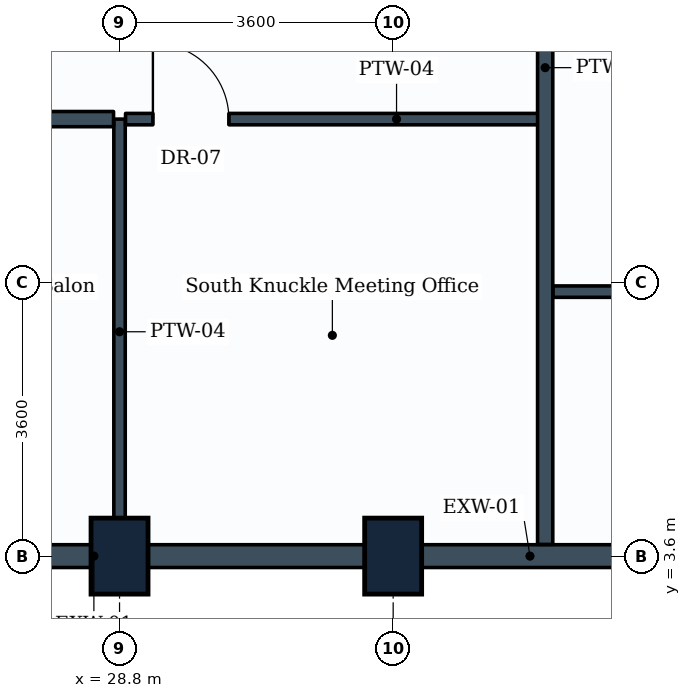
"""IFC4 building model, lengths in metres.
Left out: names, types, materials, properties, quantities, classifications, styles, units other than length and angle.
Written with IfcOpenShell. Run it as: python <this file> out.ifc"""

import sys

from ifc_helpers import new_model, si_unit, direction, frame, frame_2d, origin, origin_2d, place, context, subcontext, project, spatial, rectangle, extrude, element, fill, save


model = new_model("IFC4")
c1 = context("Model", 3, precision=1e-05, world=origin(), true_north=direction((0.0, 1.0)))
c2 = subcontext(c1, "Body", "Model", "MODEL_VIEW")
j1 = project(units=[si_unit("LENGTHUNIT", "METRE"), si_unit("PLANEANGLEUNIT", "RADIAN")], contexts=[c1])
p1 = place(None, origin())
s1 = spatial("IfcSite", under=j1, at=p1, CompositionType="ELEMENT")
p2 = place(p1, origin())
s2 = spatial("IfcBuilding", under=s1, at=p2, CompositionType="ELEMENT")
p3 = place(p2, frame((0.0, 0.0, 158.0)))
s3 = spatial("IfcBuildingStorey", under=s2, at=p3, CompositionType="ELEMENT", Elevation=158.0)
for number, where, z_axis, x_axis in (
    (1, (28.8, 3.6, 0.0), (0.0, 0.0, 1.0), (1.0, 0.0, 0.0)),
    (2, (32.4, 3.6, 0.0), (0.0, 0.0, 1.0), (1.0, 0.0, 0.0)),
):
    element("IfcColumn", number, at=place(p3, frame(where, z_axis=z_axis, x_axis=x_axis)), inside=s3, PredefinedType="COLUMN", context=c2, shape_type="SweptSolid", body=[
        extrude(rectangle(XDim=0.75, YDim=1.0, at=origin_2d()), origin(), (0.0, 0.0, 1.0), 3.8),
    ])
p4 = place(p3, frame((28.8, 3.6, 0.0), z_axis=(0.0, 0.0, 1.0), x_axis=(-1.0, 0.0, 0.0)))
e3 = element("IfcWall", 3, at=p4, inside=s3, PredefinedType="STANDARD", context=c2, shape_type="SweptSolid", body=[
    extrude(rectangle(XDim=3.6, YDim=0.3, at=frame_2d((1.8, 0.0))), origin(), (0.0, 0.0, 1.0), 2.93),
])
p5 = place(p4, frame((0.925, 0.0, 0.85)))
e4 = element("IfcOpeningElement", 4, at=p5, cuts=e3, PredefinedType="OPENING", context=c2, shape_type="SweptSolid", body=[
    extrude(rectangle(XDim=1.8, YDim=1.35, at=frame_2d((0.9, 0.675))), frame((0.0, 0.16, 0.0), z_axis=(0.0, -1.0, 0.0), x_axis=(1.0, 0.0, 0.0)), (0.0, 0.0, 1.0), 0.32),
])
p6 = place(p3, frame((32.4, 3.6, 0.0), z_axis=(0.0, 0.0, 1.0), x_axis=(-1.0, 0.0, 0.0)))
e5 = element("IfcWall", 5, at=p6, inside=s3, PredefinedType="STANDARD", context=c2, shape_type="SweptSolid", body=[
    extrude(rectangle(XDim=3.6, YDim=0.3, at=frame_2d((1.8, 0.0))), origin(), (0.0, 0.0, 1.0), 2.93),
])
p7 = place(p3, frame((36.0, 3.6, 0.0), z_axis=(0.0, 0.0, 1.0), x_axis=(-1.0, 0.0, 0.0)))
e6 = element("IfcWall", 6, at=p7, inside=s3, PredefinedType="STANDARD", context=c2, shape_type="SweptSolid", body=[
    extrude(rectangle(XDim=3.6, YDim=0.3, at=frame_2d((1.8, 0.0))), origin(), (0.0, 0.0, 1.0), 2.93),
])
p8 = place(p3, frame((28.8, 9.35, 0.0), z_axis=(0.0, 0.0, 1.0), x_axis=(0.0, -1.0, 0.0)))
e7 = element("IfcWall", 7, at=p8, inside=s3, PredefinedType="PARTITIONING", context=c2, shape_type="SweptSolid", body=[
    extrude(rectangle(XDim=5.596, YDim=0.15, at=frame_2d((2.798, 0.0))), origin(), (0.0, 0.0, 1.0), 3.535),
])
p9 = place(p3, frame((13.13, 9.35, 0.0), z_axis=(0.0, 0.0, 1.0), x_axis=(1.0, 0.0, 0.0)))
e8 = element("IfcWall", 8, at=p9, inside=s3, PredefinedType="PARTITIONING", context=c2, shape_type="SweptSolid", body=[
    extrude(rectangle(XDim=15.591, YDim=0.2, at=frame_2d((7.795, 0.0))), origin(), (0.0, 0.0, 1.0), 3.17),
])
p10 = place(p3, frame((28.879, 9.35, 0.0), z_axis=(0.0, 0.0, 1.0), x_axis=(1.0, 0.0, 0.0)))
e9 = element("IfcWall", 9, at=p10, inside=s3, PredefinedType="PARTITIONING", context=c2, shape_type="SweptSolid", body=[
    extrude(rectangle(XDim=5.521, YDim=0.15, at=frame_2d((2.76, 0.0))), origin(), (0.0, 0.0, 1.0), 3.535),
])
p11 = place(p10, frame((0.36, 0.0, 0.0)))
e10 = element("IfcOpeningElement", 10, at=p11, cuts=e9, PredefinedType="OPENING", context=c2, shape_type="SweptSolid", body=[
    extrude(rectangle(XDim=1.0, YDim=2.1, at=frame_2d((0.5, 1.05))), frame((0.0, 0.085, 0.0), z_axis=(0.0, -1.0, 0.0), x_axis=(1.0, 0.0, 0.0)), (0.0, 0.0, 1.0), 0.17),
])
p12 = place(p3, frame((34.4, 3.754, 0.0), z_axis=(0.0, 0.0, 1.0), x_axis=(0.0, 1.0, 0.0)))
e11 = element("IfcWall", 11, at=p12, inside=s3, PredefinedType="PARTITIONING", context=c2, shape_type="SweptSolid", body=[
    extrude(rectangle(XDim=12.546, YDim=0.2, at=frame_2d((6.273, 0.0))), origin(), (0.0, 0.0, 1.0), 2.93),
])
p13 = place(p3, frame((34.504, 7.08, 0.0), z_axis=(0.0, 0.0, 1.0), x_axis=(1.0, 0.0, 0.0)))
e12 = element("IfcWall", 12, at=p13, inside=s3, PredefinedType="PARTITIONING", context=c2, shape_type="SweptSolid", body=[
    extrude(rectangle(XDim=2.996, YDim=0.15, at=frame_2d((1.498, 0.0))), origin(), (0.0, 0.0, 1.0), 3.17),
])
p14 = place(p13, frame((1.021, 0.0, 0.0)))
e13 = element("IfcOpeningElement", 13, at=p14, cuts=e12, PredefinedType="OPENING", context=c2, shape_type="SweptSolid", body=[
    extrude(rectangle(XDim=0.85, YDim=2.1, at=frame_2d((0.425, 1.05))), frame((0.0, 0.085, 0.0), z_axis=(0.0, -1.0, 0.0), x_axis=(1.0, 0.0, 0.0)), (0.0, 0.0, 1.0), 0.17),
])
p15 = place(p11, origin())
e14 = element("IfcDoor", 14, at=p15, inside=s3, OperationType="SINGLE_SWING_LEFT", PredefinedType="DOOR", context=c2, shape_type="SweptSolid", body=[
    extrude(rectangle(XDim=1.0, YDim=2.1, at=frame_2d((0.5, 1.05))), frame((0.0, 0.025, 0.0), z_axis=(0.0, -1.0, 0.0), x_axis=(1.0, 0.0, 0.0)), (0.0, 0.0, 1.0), 0.05),
])
fill(e10, e14)
save(model, sys.argv[1])
